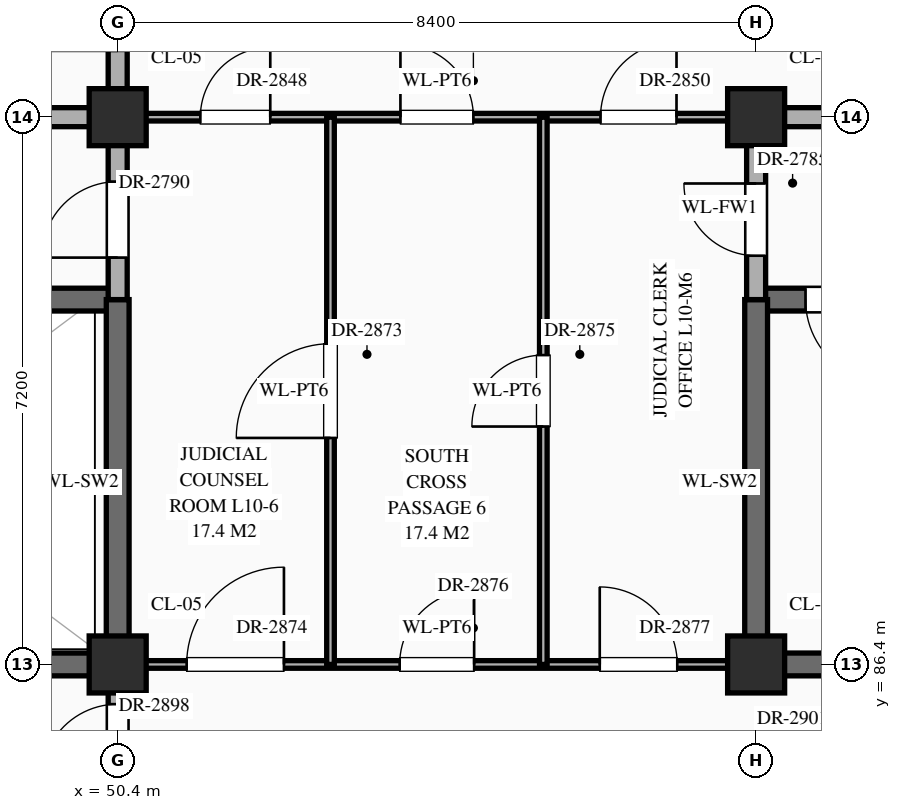
"""IFC4 building model, lengths in metres.
Left out: names, types, materials, properties, quantities, classifications, styles, units other than length and angle.
Written with IfcOpenShell. Run it as: python <this file> out.ifc"""

import sys

from ifc_helpers import new_model, si_unit, direction, frame, frame_2d, origin, origin_2d, place, context, subcontext, project, spatial, rectangle, extrude, element, fill, save


model = new_model("IFC4")
c1 = context("Model", 3, precision=1e-05, world=origin(), true_north=direction((0.0, 1.0)))
c2 = subcontext(c1, "Body", "Model", "MODEL_VIEW")
j1 = project(units=[si_unit("LENGTHUNIT", "METRE"), si_unit("PLANEANGLEUNIT", "RADIAN")], contexts=[c1])
p1 = place(None, origin())
s1 = spatial("IfcSite", under=j1, at=p1, CompositionType="ELEMENT")
p2 = place(p1, origin())
s2 = spatial("IfcBuilding", under=s1, at=p2, CompositionType="ELEMENT")
p3 = place(p2, frame((0.0, 0.0, 43.5)))
s3 = spatial("IfcBuildingStorey", under=s2, at=p3, CompositionType="ELEMENT", Elevation=43.5)
for number, where, z_axis, x_axis in (
    (1, (50.4, 86.4, 0.0), (0.0, 0.0, 1.0), (1.0, 0.0, 0.0)),
    (2, (50.4, 93.6, 0.0), (0.0, 0.0, 1.0), (1.0, 0.0, 0.0)),
    (3, (58.8, 86.4, 0.0), (0.0, 0.0, 1.0), (1.0, 0.0, 0.0)),
    (4, (58.8, 93.6, 0.0), (0.0, 0.0, 1.0), (1.0, 0.0, 0.0)),
):
    element("IfcColumn", number, at=place(p3, frame(where, z_axis=z_axis, x_axis=x_axis)), inside=s3, PredefinedType="COLUMN", context=c2, shape_type="SweptSolid", body=[
        extrude(rectangle(XDim=0.75, YDim=0.75, at=origin_2d()), origin(), (0.0, 0.0, 1.0), 4.2),
    ])
p4 = place(p3, frame((42.04, 86.4, 0.0), z_axis=(0.0, 0.0, 1.0), x_axis=(1.0, 0.0, 0.0)))
e5 = element("IfcWall", 5, at=p4, inside=s3, PredefinedType="SHEAR", context=c2, shape_type="SweptSolid", body=[
    extrude(rectangle(XDim=8.36, YDim=0.3, at=frame_2d((4.18, 0.0))), origin(), (0.0, 0.0, 1.0), 4.0),
])
p5 = place(p3, frame((50.4, 86.4, 0.0), z_axis=(0.0, 0.0, 1.0), x_axis=(1.0, 0.0, 0.0)))
e6 = element("IfcWall", 6, at=p5, inside=s3, PredefinedType="STANDARD", context=c2, shape_type="SweptSolid", body=[
    extrude(rectangle(XDim=8.4, YDim=0.1, at=frame_2d((4.2, 0.0))), origin(), (0.0, 0.0, 1.0), 3.1),
])
p6 = place(p5, frame((0.907, 0.0, 0.0)))
e7 = element("IfcOpeningElement", 7, at=p6, cuts=e6, PredefinedType="OPENING", context=c2, shape_type="SweptSolid", body=[
    extrude(rectangle(XDim=1.28, YDim=2.35, at=frame_2d((0.64, 1.175))), frame((0.0, 0.062, 0.0), z_axis=(0.0, -1.0, 0.0), x_axis=(1.0, 0.0, 0.0)), (0.0, 0.0, 1.0), 0.124),
])
p7 = place(p5, frame((3.71, 0.0, 0.0)))
e8 = element("IfcOpeningElement", 8, at=p7, cuts=e6, PredefinedType="OPENING", context=c2, shape_type="SweptSolid", body=[
    extrude(rectangle(XDim=0.98, YDim=2.35, at=frame_2d((0.49, 1.175))), frame((0.0, 0.062, 0.0), z_axis=(0.0, -1.0, 0.0), x_axis=(1.0, 0.0, 0.0)), (0.0, 0.0, 1.0), 0.124),
])
p8 = place(p5, frame((6.343, 0.0, 0.0)))
e9 = element("IfcOpeningElement", 9, at=p8, cuts=e6, PredefinedType="OPENING", context=c2, shape_type="SweptSolid", body=[
    extrude(rectangle(XDim=1.02, YDim=2.4, at=frame_2d((0.51, 1.2))), frame((0.0, 0.062, 0.0), z_axis=(0.0, -1.0, 0.0), x_axis=(1.0, 0.0, 0.0)), (0.0, 0.0, 1.0), 0.124),
])
p9 = place(p3, frame((58.8, 86.4, 0.0), z_axis=(0.0, 0.0, 1.0), x_axis=(1.0, 0.0, 0.0)))
e10 = element("IfcWall", 10, at=p9, inside=s3, PredefinedType="SHEAR", context=c2, shape_type="SweptSolid", body=[
    extrude(rectangle(XDim=8.4, YDim=0.3, at=frame_2d((4.2, 0.0))), origin(), (0.0, 0.0, 1.0), 3.95),
])
p10 = place(p3, frame((42.04, 91.2, 0.0), z_axis=(0.0, 0.0, 1.0), x_axis=(1.0, 0.0, 0.0)))
e11 = element("IfcWall", 11, at=p10, inside=s3, PredefinedType="SHEAR", context=c2, shape_type="SweptSolid", body=[
    extrude(rectangle(XDim=8.36, YDim=0.3, at=frame_2d((4.18, 0.0))), origin(), (0.0, 0.0, 1.0), 4.0),
])
p11 = place(p10, frame((0.61, 0.0, 0.0)))
e12 = element("IfcOpeningElement", 12, at=p11, cuts=e11, PredefinedType="OPENING", context=c2, shape_type="SweptSolid", body=[
    extrude(rectangle(XDim=1.1, YDim=2.2, at=frame_2d((0.55, 1.1))), frame((0.0, 0.162, 0.0), z_axis=(0.0, -1.0, 0.0), x_axis=(1.0, 0.0, 0.0)), (0.0, 0.0, 1.0), 0.324),
])
p12 = place(p3, frame((58.8, 91.2, 0.0), z_axis=(0.0, 0.0, 1.0), x_axis=(1.0, 0.0, 0.0)))
e13 = element("IfcWall", 13, at=p12, inside=s3, PredefinedType="SHEAR", context=c2, shape_type="SweptSolid", body=[
    extrude(rectangle(XDim=8.4, YDim=0.3, at=frame_2d((4.2, 0.0))), origin(), (0.0, 0.0, 1.0), 3.95),
])
p13 = place(p12, frame((0.65, 0.0, 0.0)))
e14 = element("IfcOpeningElement", 14, at=p13, cuts=e13, PredefinedType="OPENING", context=c2, shape_type="SweptSolid", body=[
    extrude(rectangle(XDim=1.1, YDim=2.2, at=frame_2d((0.55, 1.1))), frame((0.0, 0.162, 0.0), z_axis=(0.0, -1.0, 0.0), x_axis=(1.0, 0.0, 0.0)), (0.0, 0.0, 1.0), 0.324),
])
p14 = place(p3, frame((42.04, 93.6, 0.0), z_axis=(0.0, 0.0, 1.0), x_axis=(1.0, 0.0, 0.0)))
e15 = element("IfcWall", 15, at=p14, inside=s3, PredefinedType="STANDARD", context=c2, shape_type="SweptSolid", body=[
    extrude(rectangle(XDim=8.36, YDim=0.25, at=frame_2d((4.18, 0.0))), origin(), (0.0, 0.0, 1.0), 3.15),
])
p15 = place(p14, frame((3.16, 0.0, 0.0)))
e16 = element("IfcOpeningElement", 16, at=p15, cuts=e15, PredefinedType="OPENING", context=c2, shape_type="SweptSolid", body=[
    extrude(rectangle(XDim=2.0, YDim=2.4, at=frame_2d((1.0, 1.2))), frame((0.0, 0.137, 0.0), z_axis=(0.0, -1.0, 0.0), x_axis=(1.0, 0.0, 0.0)), (0.0, 0.0, 1.0), 0.274),
])
p16 = place(p3, frame((50.4, 93.6, 0.0), z_axis=(0.0, 0.0, 1.0), x_axis=(1.0, 0.0, 0.0)))
e17 = element("IfcWall", 17, at=p16, inside=s3, PredefinedType="STANDARD", context=c2, shape_type="SweptSolid", body=[
    extrude(rectangle(XDim=8.4, YDim=0.1, at=frame_2d((4.2, 0.0))), origin(), (0.0, 0.0, 1.0), 3.1),
])
p17 = place(p16, frame((1.087, 0.0, 0.0)))
e18 = element("IfcOpeningElement", 18, at=p17, cuts=e17, PredefinedType="OPENING", context=c2, shape_type="SweptSolid", body=[
    extrude(rectangle(XDim=0.92, YDim=2.15, at=frame_2d((0.46, 1.075))), frame((0.0, 0.062, 0.0), z_axis=(0.0, -1.0, 0.0), x_axis=(1.0, 0.0, 0.0)), (0.0, 0.0, 1.0), 0.124),
])
p18 = place(p16, frame((3.72, 0.0, 0.0)))
e19 = element("IfcOpeningElement", 19, at=p18, cuts=e17, PredefinedType="OPENING", context=c2, shape_type="SweptSolid", body=[
    extrude(rectangle(XDim=0.96, YDim=2.2, at=frame_2d((0.48, 1.1))), frame((0.0, 0.062, 0.0), z_axis=(0.0, -1.0, 0.0), x_axis=(1.0, 0.0, 0.0)), (0.0, 0.0, 1.0), 0.124),
])
p19 = place(p16, frame((6.353, 0.0, 0.0)))
e20 = element("IfcOpeningElement", 20, at=p19, cuts=e17, PredefinedType="OPENING", context=c2, shape_type="SweptSolid", body=[
    extrude(rectangle(XDim=1.0, YDim=2.25, at=frame_2d((0.5, 1.125))), frame((0.0, 0.062, 0.0), z_axis=(0.0, -1.0, 0.0), x_axis=(1.0, 0.0, 0.0)), (0.0, 0.0, 1.0), 0.124),
])
p20 = place(p3, frame((58.8, 93.6, 0.0), z_axis=(0.0, 0.0, 1.0), x_axis=(1.0, 0.0, 0.0)))
e21 = element("IfcWall", 21, at=p20, inside=s3, PredefinedType="STANDARD", context=c2, shape_type="SweptSolid", body=[
    extrude(rectangle(XDim=8.4, YDim=0.25, at=frame_2d((4.2, 0.0))), origin(), (0.0, 0.0, 1.0), 3.1),
])
p21 = place(p20, frame((3.45, 0.0, 0.0)))
e22 = element("IfcOpeningElement", 22, at=p21, cuts=e21, PredefinedType="OPENING", context=c2, shape_type="SweptSolid", body=[
    extrude(rectangle(XDim=1.5, YDim=2.25, at=frame_2d((0.75, 1.125))), frame((0.0, 0.137, 0.0), z_axis=(0.0, -1.0, 0.0), x_axis=(1.0, 0.0, 0.0)), (0.0, 0.0, 1.0), 0.274),
])
p22 = place(p3, frame((50.4, 79.24, 0.0), z_axis=(0.0, 0.0, 1.0), x_axis=(0.0, 1.0, 0.0)))
e23 = element("IfcWall", 23, at=p22, inside=s3, PredefinedType="STANDARD", context=c2, shape_type="SweptSolid", body=[
    extrude(rectangle(XDim=7.16, YDim=0.25, at=frame_2d((3.58, 0.0))), origin(), (0.0, 0.0, 1.0), 3.2),
])
p23 = place(p22, frame((5.637, 0.0, 0.0)))
e24 = element("IfcOpeningElement", 24, at=p23, cuts=e23, PredefinedType="OPENING", context=c2, shape_type="SweptSolid", body=[
    extrude(rectangle(XDim=1.0, YDim=2.2, at=frame_2d((0.5, 1.1))), frame((0.0, 0.137, 0.0), z_axis=(0.0, -1.0, 0.0), x_axis=(1.0, 0.0, 0.0)), (0.0, 0.0, 1.0), 0.274),
])
p24 = place(p22, frame((1.933, 0.0, 0.0)))
e25 = element("IfcOpeningElement", 25, at=p24, cuts=e23, PredefinedType="OPENING", context=c2, shape_type="SweptSolid", body=[
    extrude(rectangle(XDim=1.8, YDim=2.35, at=frame_2d((0.9, 1.175))), frame((0.0, 0.137, 0.0), z_axis=(0.0, -1.0, 0.0), x_axis=(1.0, 0.0, 0.0)), (0.0, 0.0, 1.0), 0.274),
])
p25 = place(p3, frame((50.4, 86.4, 0.0), z_axis=(0.0, 0.0, 1.0), x_axis=(0.0, 1.0, 0.0)))
e26 = element("IfcWall", 26, at=p25, inside=s3, PredefinedType="SHEAR", context=c2, shape_type="SweptSolid", body=[
    extrude(rectangle(XDim=4.8, YDim=0.3, at=frame_2d((2.4, 0.0))), origin(), (0.0, 0.0, 1.0), 4.0),
])
p26 = place(p3, frame((50.4, 91.2, 0.0), z_axis=(0.0, 0.0, 1.0), x_axis=(0.0, 1.0, 0.0)))
e27 = element("IfcWall", 27, at=p26, inside=s3, PredefinedType="STANDARD", context=c2, shape_type="SweptSolid", body=[
    extrude(rectangle(XDim=13.2, YDim=0.25, at=frame_2d((6.6, 0.0))), origin(), (0.0, 0.0, 1.0), 3.2),
])
p27 = place(p26, frame((0.552, 0.0, 0.0)))
e28 = element("IfcOpeningElement", 28, at=p27, cuts=e27, PredefinedType="OPENING", context=c2, shape_type="SweptSolid", body=[
    extrude(rectangle(XDim=1.0, YDim=2.2, at=frame_2d((0.5, 1.1))), frame((0.0, 0.137, 0.0), z_axis=(0.0, -1.0, 0.0), x_axis=(1.0, 0.0, 0.0)), (0.0, 0.0, 1.0), 0.274),
])
p28 = place(p26, frame((10.448, 0.0, 0.0)))
e29 = element("IfcOpeningElement", 29, at=p28, cuts=e27, PredefinedType="OPENING", context=c2, shape_type="SweptSolid", body=[
    extrude(rectangle(XDim=1.0, YDim=2.2, at=frame_2d((0.5, 1.1))), frame((0.0, 0.137, 0.0), z_axis=(0.0, -1.0, 0.0), x_axis=(1.0, 0.0, 0.0)), (0.0, 0.0, 1.0), 0.274),
])
p29 = place(p26, frame((3.272, 0.0, 0.0)))
e30 = element("IfcOpeningElement", 30, at=p29, cuts=e27, PredefinedType="OPENING", context=c2, shape_type="SweptSolid", body=[
    extrude(rectangle(XDim=0.95, YDim=2.15, at=frame_2d((0.475, 1.075))), frame((0.0, 0.137, 0.0), z_axis=(0.0, -1.0, 0.0), x_axis=(1.0, 0.0, 0.0)), (0.0, 0.0, 1.0), 0.274),
])
p30 = place(p3, frame((53.2, 86.4, 0.0), z_axis=(0.0, 0.0, 1.0), x_axis=(0.0, 1.0, 0.0)))
e31 = element("IfcWall", 31, at=p30, inside=s3, PredefinedType="STANDARD", context=c2, shape_type="SweptSolid", body=[
    extrude(rectangle(XDim=7.2, YDim=0.1, at=frame_2d((3.6, 0.0))), origin(), (0.0, 0.0, 1.0), 3.95),
])
p31 = place(p30, frame((2.98, 0.0, 0.0)))
e32 = element("IfcOpeningElement", 32, at=p31, cuts=e31, PredefinedType="OPENING", context=c2, shape_type="SweptSolid", body=[
    extrude(rectangle(XDim=1.24, YDim=2.3, at=frame_2d((0.62, 1.15))), frame((0.0, 0.062, 0.0), z_axis=(0.0, -1.0, 0.0), x_axis=(1.0, 0.0, 0.0)), (0.0, 0.0, 1.0), 0.124),
])
p32 = place(p3, frame((56.0, 86.4, 0.0), z_axis=(0.0, 0.0, 1.0), x_axis=(0.0, 1.0, 0.0)))
e33 = element("IfcWall", 33, at=p32, inside=s3, PredefinedType="STANDARD", context=c2, shape_type="SweptSolid", body=[
    extrude(rectangle(XDim=7.2, YDim=0.1, at=frame_2d((3.6, 0.0))), origin(), (0.0, 0.0, 1.0), 3.95),
])
p33 = place(p32, frame((3.13, 0.0, 0.0)))
e34 = element("IfcOpeningElement", 34, at=p33, cuts=e33, PredefinedType="OPENING", context=c2, shape_type="SweptSolid", body=[
    extrude(rectangle(XDim=0.94, YDim=2.3, at=frame_2d((0.47, 1.15))), frame((0.0, 0.062, 0.0), z_axis=(0.0, -1.0, 0.0), x_axis=(1.0, 0.0, 0.0)), (0.0, 0.0, 1.0), 0.124),
])
p34 = place(p3, frame((58.8, 86.4, 0.0), z_axis=(0.0, 0.0, 1.0), x_axis=(0.0, 1.0, 0.0)))
e35 = element("IfcWall", 35, at=p34, inside=s3, PredefinedType="SHEAR", context=c2, shape_type="SweptSolid", body=[
    extrude(rectangle(XDim=4.8, YDim=0.3, at=frame_2d((2.4, 0.0))), origin(), (0.0, 0.0, 1.0), 3.95),
])
p35 = place(p3, frame((58.8, 91.2, 0.0), z_axis=(0.0, 0.0, 1.0), x_axis=(0.0, 1.0, 0.0)))
e36 = element("IfcWall", 36, at=p35, inside=s3, PredefinedType="STANDARD", context=c2, shape_type="SweptSolid", body=[
    extrude(rectangle(XDim=2.4, YDim=0.25, at=frame_2d((1.2, 0.0))), origin(), (0.0, 0.0, 1.0), 3.2),
])
p36 = place(p35, frame((0.577, 0.0, 0.0)))
e37 = element("IfcOpeningElement", 37, at=p36, cuts=e36, PredefinedType="OPENING", context=c2, shape_type="SweptSolid", body=[
    extrude(rectangle(XDim=0.95, YDim=2.15, at=frame_2d((0.475, 1.075))), frame((0.0, 0.137, 0.0), z_axis=(0.0, -1.0, 0.0), x_axis=(1.0, 0.0, 0.0)), (0.0, 0.0, 1.0), 0.274),
])
p37 = place(p13, frame((1.1, 0.0, 0.0), z_axis=(0.0, 0.0, 1.0), x_axis=(-1.0, 0.0, 0.0)))
e38 = element("IfcDoor", 38, at=p37, inside=s3, OperationType="SINGLE_SWING_LEFT", PredefinedType="DOOR", context=c2, shape_type="SweptSolid", body=[
    extrude(rectangle(XDim=1.1, YDim=2.2, at=frame_2d((0.55, 1.1))), frame((0.0, 0.025, 0.0), z_axis=(0.0, -1.0, 0.0), x_axis=(1.0, 0.0, 0.0)), (0.0, 0.0, 1.0), 0.05),
])
fill(e14, e38)
p38 = place(p36, origin())
e39 = element("IfcDoor", 39, at=p38, inside=s3, OperationType="SINGLE_SWING_RIGHT", PredefinedType="DOOR", context=c2, shape_type="SweptSolid", body=[
    extrude(rectangle(XDim=0.95, YDim=2.15, at=frame_2d((0.475, 1.075))), frame((0.0, 0.025, 0.0), z_axis=(0.0, -1.0, 0.0), x_axis=(1.0, 0.0, 0.0)), (0.0, 0.0, 1.0), 0.05),
])
fill(e37, e39)
p39 = place(p27, origin())
e40 = element("IfcDoor", 40, at=p39, inside=s3, OperationType="SINGLE_SWING_LEFT", PredefinedType="DOOR", context=c2, shape_type="SweptSolid", body=[
    extrude(rectangle(XDim=1.0, YDim=2.2, at=frame_2d((0.5, 1.1))), frame((0.0, 0.025, 0.0), z_axis=(0.0, -1.0, 0.0), x_axis=(1.0, 0.0, 0.0)), (0.0, 0.0, 1.0), 0.05),
])
fill(e28, e40)
p40 = place(p17, origin())
e41 = element("IfcDoor", 41, at=p40, inside=s3, OperationType="SINGLE_SWING_RIGHT", PredefinedType="DOOR", context=c2, shape_type="SweptSolid", body=[
    extrude(rectangle(XDim=0.92, YDim=2.15, at=frame_2d((0.46, 1.075))), frame((0.0, 0.025, 0.0), z_axis=(0.0, -1.0, 0.0), x_axis=(1.0, 0.0, 0.0)), (0.0, 0.0, 1.0), 0.05),
])
fill(e18, e41)
p41 = place(p18, origin())
e42 = element("IfcDoor", 42, at=p41, inside=s3, OperationType="SINGLE_SWING_LEFT", PredefinedType="DOOR", context=c2, shape_type="SweptSolid", body=[
    extrude(rectangle(XDim=0.96, YDim=2.2, at=frame_2d((0.48, 1.1))), frame((0.0, 0.025, 0.0), z_axis=(0.0, -1.0, 0.0), x_axis=(1.0, 0.0, 0.0)), (0.0, 0.0, 1.0), 0.05),
])
fill(e19, e42)
p42 = place(p19, origin())
e43 = element("IfcDoor", 43, at=p42, inside=s3, OperationType="SINGLE_SWING_RIGHT", PredefinedType="DOOR", context=c2, shape_type="SweptSolid", body=[
    extrude(rectangle(XDim=1.0, YDim=2.25, at=frame_2d((0.5, 1.125))), frame((0.0, 0.025, 0.0), z_axis=(0.0, -1.0, 0.0), x_axis=(1.0, 0.0, 0.0)), (0.0, 0.0, 1.0), 0.05),
])
fill(e20, e43)
p43 = place(p31, origin())
e44 = element("IfcDoor", 44, at=p43, inside=s3, OperationType="SINGLE_SWING_LEFT", PredefinedType="DOOR", context=c2, shape_type="SweptSolid", body=[
    extrude(rectangle(XDim=1.24, YDim=2.3, at=frame_2d((0.62, 1.15))), frame((0.0, 0.025, 0.0), z_axis=(0.0, -1.0, 0.0), x_axis=(1.0, 0.0, 0.0)), (0.0, 0.0, 1.0), 0.05),
])
fill(e32, e44)
p44 = place(p6, origin())
e45 = element("IfcDoor", 45, at=p44, inside=s3, OperationType="SINGLE_SWING_RIGHT", PredefinedType="DOOR", context=c2, shape_type="SweptSolid", body=[
    extrude(rectangle(XDim=1.28, YDim=2.35, at=frame_2d((0.64, 1.175))), frame((0.0, 0.025, 0.0), z_axis=(0.0, -1.0, 0.0), x_axis=(1.0, 0.0, 0.0)), (0.0, 0.0, 1.0), 0.05),
])
fill(e7, e45)
p45 = place(p33, origin())
e46 = element("IfcDoor", 46, at=p45, inside=s3, OperationType="SINGLE_SWING_LEFT", PredefinedType="DOOR", context=c2, shape_type="SweptSolid", body=[
    extrude(rectangle(XDim=0.94, YDim=2.3, at=frame_2d((0.47, 1.15))), frame((0.0, 0.025, 0.0), z_axis=(0.0, -1.0, 0.0), x_axis=(1.0, 0.0, 0.0)), (0.0, 0.0, 1.0), 0.05),
])
fill(e34, e46)
p46 = place(p7, origin())
e47 = element("IfcDoor", 47, at=p46, inside=s3, OperationType="SINGLE_SWING_RIGHT", PredefinedType="DOOR", context=c2, shape_type="SweptSolid", body=[
    extrude(rectangle(XDim=0.98, YDim=2.35, at=frame_2d((0.49, 1.175))), frame((0.0, 0.025, 0.0), z_axis=(0.0, -1.0, 0.0), x_axis=(1.0, 0.0, 0.0)), (0.0, 0.0, 1.0), 0.05),
])
fill(e8, e47)
p47 = place(p8, origin())
e48 = element("IfcDoor", 48, at=p47, inside=s3, OperationType="SINGLE_SWING_LEFT", PredefinedType="DOOR", context=c2, shape_type="SweptSolid", body=[
    extrude(rectangle(XDim=1.02, YDim=2.4, at=frame_2d((0.51, 1.2))), frame((0.0, 0.025, 0.0), z_axis=(0.0, -1.0, 0.0), x_axis=(1.0, 0.0, 0.0)), (0.0, 0.0, 1.0), 0.05),
])
fill(e9, e48)
p48 = place(p23, origin())
e49 = element("IfcDoor", 49, at=p48, inside=s3, OperationType="SINGLE_SWING_LEFT", PredefinedType="DOOR", context=c2, shape_type="SweptSolid", body=[
    extrude(rectangle(XDim=1.0, YDim=2.2, at=frame_2d((0.5, 1.1))), frame((0.0, 0.025, 0.0), z_axis=(0.0, -1.0, 0.0), x_axis=(1.0, 0.0, 0.0)), (0.0, 0.0, 1.0), 0.05),
])
fill(e24, e49)
save(model, sys.argv[1])
